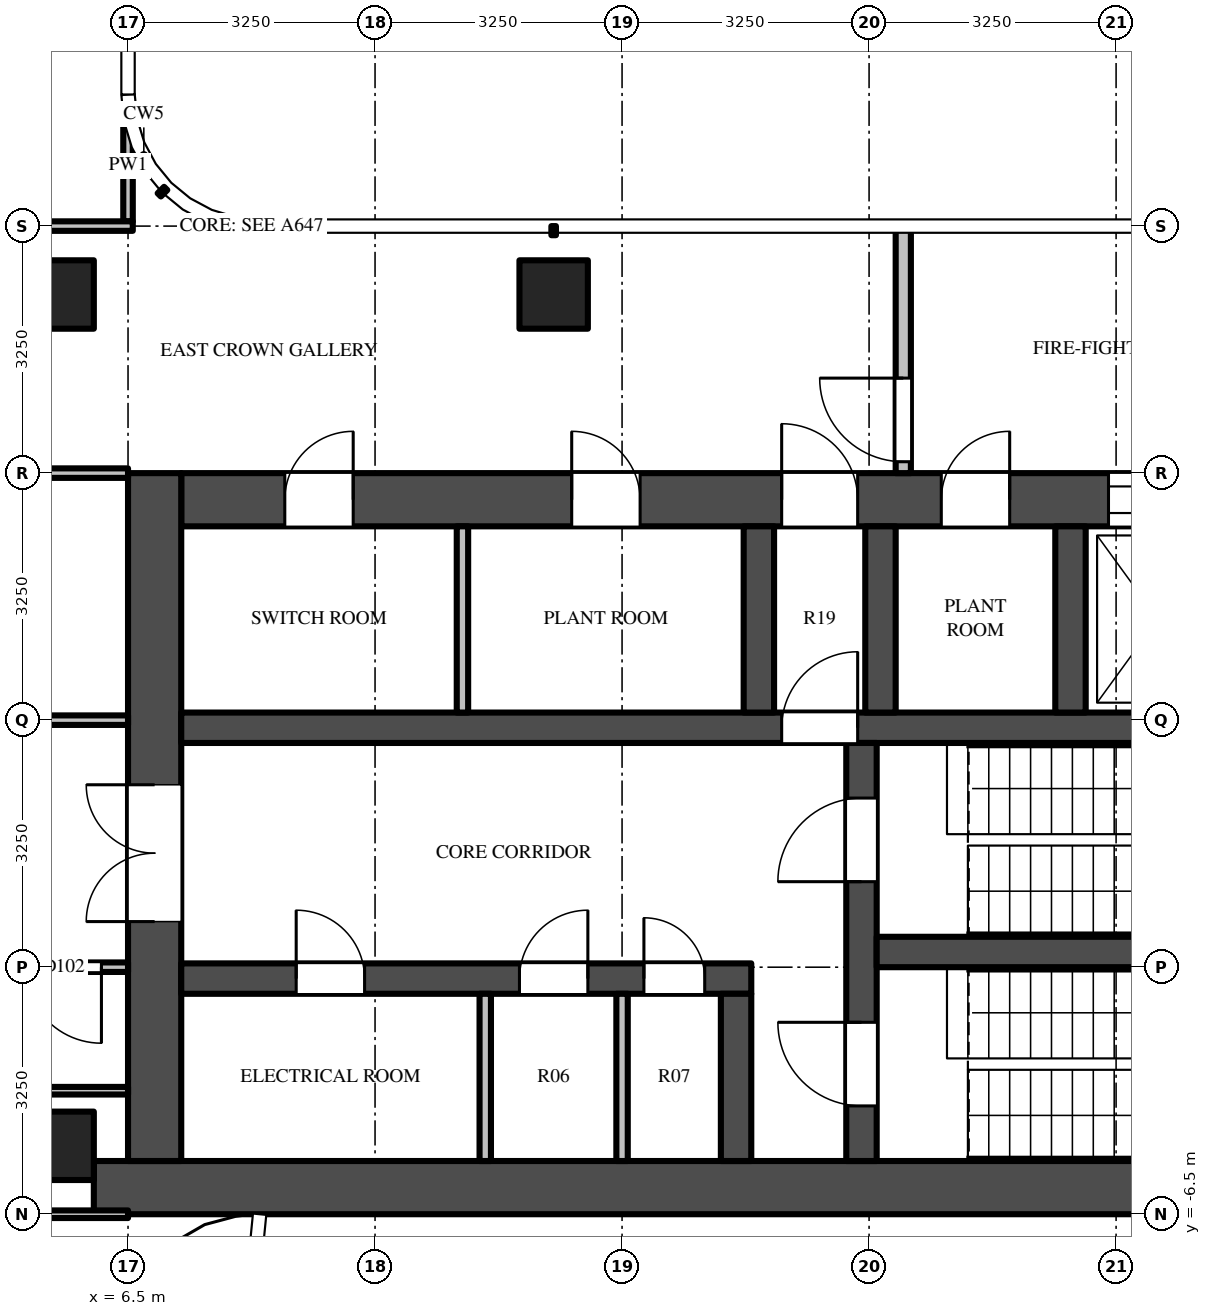
"""IFC4 building model, lengths in metres.
Left out: names, types, materials, properties, quantities, classifications, styles, units other than length and angle.
Written with IfcOpenShell. Run it as: python <this file> out.ifc"""

import sys

from ifc_helpers import new_model, si_unit, direction, frame, frame_2d, origin, origin_2d, place, context, subcontext, project, spatial, rectangle, extrude, source, transform, mapped, element, fill, save


model = new_model("IFC4")
c1 = context("Model", 3, precision=1e-05, world=origin(), true_north=direction((0.0, 1.0)))
c2 = subcontext(c1, "Body", "Model", "MODEL_VIEW")
j1 = project(units=[si_unit("LENGTHUNIT", "METRE"), si_unit("PLANEANGLEUNIT", "RADIAN")], contexts=[c1])
p1 = place(None, origin())
s1 = spatial("IfcSite", under=j1, at=p1, CompositionType="ELEMENT")
p2 = place(p1, origin())
s2 = spatial("IfcBuilding", under=s1, at=p2, CompositionType="ELEMENT")
p3 = place(p2, frame((0.0, 0.0, 346.1)))
s3 = spatial("IfcBuildingStorey", under=s2, at=p3, CompositionType="ELEMENT", Elevation=346.1)
m1 = source(origin(), c2, "Body", "SweptSolid", [
    extrude(rectangle(XDim=0.9, YDim=0.9, at=origin_2d()), origin(), (0.0, 0.0, 1.0), 4.0),
])
for number, where, z_axis, x_axis in (
    (1, (12.1, 5.6, 0.0), (0.0, 0.0, 1.0), (1.0, 0.0, 0.0)),
    (2, (5.6, 5.6, 0.0), (0.0, 0.0, 1.0), (1.0, 0.0, 0.0)),
    (3, (5.6, -5.6, 0.0), (0.0, 0.0, 1.0), (1.0, 0.0, 0.0)),
):
    element("IfcColumn", number, at=place(p3, frame(where, z_axis=z_axis, x_axis=x_axis)), inside=s3, PredefinedType="COLUMN", context=c2, shape_type="MappedRepresentation", body=[
        mapped(m1, transform((0.0, 0.0, 0.0))),
    ])
m2 = source(origin(), c2, "Body", "SweptSolid", [
    extrude(rectangle(XDim=16.7, YDim=0.7, at=frame_2d((8.35, 0.0))), origin(), (0.0, 0.0, 1.0), 3.75),
])
p4 = place(p3, frame((6.05, -6.15, 0.0), z_axis=(0.0, 0.0, 1.0), x_axis=(1.0, 0.0, 0.0)))
e4 = element("IfcWall", 4, at=p4, inside=s3, PredefinedType="SHEAR", context=c2, shape_type="MappedRepresentation", body=[
    mapped(m2, transform((0.0, 0.0, 0.0))),
])
m3 = source(origin(), c2, "Body", "SweptSolid", [
    extrude(rectangle(XDim=14.85, YDim=0.7, at=frame_2d((7.425, 0.0))), origin(), (0.0, 0.0, 1.0), 3.75),
])
p5 = place(p3, frame((7.2, 2.9, 0.0), z_axis=(0.0, 0.0, 1.0), x_axis=(1.0, 0.0, 0.0)))
e5 = element("IfcWall", 5, at=p5, inside=s3, PredefinedType="SHEAR", context=c2, shape_type="MappedRepresentation", body=[
    mapped(m3, transform((0.0, 0.0, 0.0))),
])
m4 = source(origin(), c2, "Body", "SweptSolid", [
    extrude(rectangle(XDim=1.3, YDim=2.1, at=frame_2d((0.65, 1.05))), frame((0.0, 0.36, 0.0), z_axis=(0.0, -1.0, 0.0), x_axis=(1.0, 0.0, 0.0)), (0.0, 0.0, 1.0), 0.72),
])
p6 = place(p5, frame((12.2, 0.0, 0.0)))
e6 = element("IfcOpeningElement", 6, at=p6, cuts=e5, PredefinedType="OPENING", context=c2, shape_type="MappedRepresentation", body=[
    mapped(m4, transform((0.0, 0.0, 0.0))),
])
m5 = source(origin(), c2, "Body", "SweptSolid", [
    extrude(rectangle(XDim=1.0, YDim=2.1, at=frame_2d((0.5, 1.05))), frame((0.0, 0.36, 0.0), z_axis=(0.0, -1.0, 0.0), x_axis=(1.0, 0.0, 0.0)), (0.0, 0.0, 1.0), 0.72),
])
p7 = place(p5, frame((7.9, 0.0, 0.0)))
e7 = element("IfcOpeningElement", 7, at=p7, cuts=e5, PredefinedType="OPENING", context=c2, shape_type="MappedRepresentation", body=[
    mapped(m5, transform((0.0, 0.0, 0.0))),
])
m6 = source(origin(), c2, "Body", "SweptSolid", [
    extrude(rectangle(XDim=0.9, YDim=2.1, at=frame_2d((0.45, 1.05))), frame((0.0, 0.36, 0.0), z_axis=(0.0, -1.0, 0.0), x_axis=(1.0, 0.0, 0.0)), (0.0, 0.0, 1.0), 0.72),
])
p8 = place(p5, frame((1.363, 0.0, 0.0)))
e8 = element("IfcOpeningElement", 8, at=p8, cuts=e5, PredefinedType="OPENING", context=c2, shape_type="MappedRepresentation", body=[
    mapped(m6, transform((0.0, 0.0, 0.0))),
])
p9 = place(p5, frame((5.137, 0.0, 0.0)))
e9 = element("IfcOpeningElement", 9, at=p9, cuts=e5, PredefinedType="OPENING", context=c2, shape_type="MappedRepresentation", body=[
    mapped(m6, transform((0.0, 0.0, 0.0))),
])
p10 = place(p5, frame((10.0, 0.0, 0.0)))
e10 = element("IfcOpeningElement", 10, at=p10, cuts=e5, PredefinedType="OPENING", context=c2, shape_type="MappedRepresentation", body=[
    mapped(m6, transform((0.0, 0.0, 0.0))),
])
m7 = source(origin(), c2, "Body", "SweptSolid", [
    extrude(rectangle(XDim=9.05, YDim=0.7, at=frame_2d((4.525, 0.0))), origin(), (0.0, 0.0, 1.0), 3.75),
])
p11 = place(p3, frame((6.85, -5.8, 0.0), z_axis=(0.0, 0.0, 1.0), x_axis=(0.0, 1.0, 0.0)))
e11 = element("IfcWall", 11, at=p11, inside=s3, PredefinedType="SHEAR", context=c2, shape_type="MappedRepresentation", body=[
    mapped(m7, transform((0.0, 0.0, 0.0))),
])
m8 = source(origin(), c2, "Body", "SweptSolid", [
    extrude(rectangle(XDim=1.8, YDim=2.1, at=frame_2d((0.9, 1.05))), frame((0.0, 0.36, 0.0), z_axis=(0.0, -1.0, 0.0), x_axis=(1.0, 0.0, 0.0)), (0.0, 0.0, 1.0), 0.72),
])
p12 = place(p11, frame((3.15, 0.0, 0.0)))
e12 = element("IfcOpeningElement", 12, at=p12, cuts=e11, PredefinedType="OPENING", context=c2, shape_type="MappedRepresentation", body=[
    mapped(m8, transform((0.0, 0.0, 0.0))),
])
m9 = source(origin(), c2, "Body", "SweptSolid", [
    extrude(rectangle(XDim=7.5, YDim=0.4, at=frame_2d((3.75, 0.0))), origin(), (0.0, 0.0, 1.0), 3.75),
])
p13 = place(p3, frame((7.2, -3.4, 0.0), z_axis=(0.0, 0.0, 1.0), x_axis=(1.0, 0.0, 0.0)))
e13 = element("IfcWall", 13, at=p13, inside=s3, PredefinedType="SHEAR", context=c2, shape_type="MappedRepresentation", body=[
    mapped(m9, transform((0.0, 0.0, 0.0))),
])
m10 = source(origin(), c2, "Body", "SweptSolid", [
    extrude(rectangle(XDim=0.9, YDim=2.1, at=frame_2d((0.45, 1.05))), frame((0.0, 0.21, 0.0), z_axis=(0.0, -1.0, 0.0), x_axis=(1.0, 0.0, 0.0)), (0.0, 0.0, 1.0), 0.42),
])
p14 = place(p13, frame((1.512, 0.0, 0.0)))
e14 = element("IfcOpeningElement", 14, at=p14, cuts=e13, PredefinedType="OPENING", context=c2, shape_type="MappedRepresentation", body=[
    mapped(m10, transform((0.0, 0.0, 0.0))),
])
p15 = place(p13, frame((4.45, 0.0, 0.0)))
e15 = element("IfcOpeningElement", 15, at=p15, cuts=e13, PredefinedType="OPENING", context=c2, shape_type="MappedRepresentation", body=[
    mapped(m10, transform((0.0, 0.0, 0.0))),
])
m11 = source(origin(), c2, "Body", "SweptSolid", [
    extrude(rectangle(XDim=0.8, YDim=2.1, at=frame_2d((0.4, 1.05))), frame((0.0, 0.21, 0.0), z_axis=(0.0, -1.0, 0.0), x_axis=(1.0, 0.0, 0.0)), (0.0, 0.0, 1.0), 0.42),
])
p16 = place(p13, frame((6.087, 0.0, 0.0)))
e16 = element("IfcOpeningElement", 16, at=p16, cuts=e13, PredefinedType="OPENING", context=c2, shape_type="MappedRepresentation", body=[
    mapped(m11, transform((0.0, 0.0, 0.0))),
])
m12 = source(origin(), c2, "Body", "SweptSolid", [
    extrude(rectangle(XDim=14.85, YDim=0.4, at=frame_2d((7.425, 0.0))), origin(), (0.0, 0.0, 1.0), 3.75),
])
p17 = place(p3, frame((7.2, -0.1, 0.0), z_axis=(0.0, 0.0, 1.0), x_axis=(1.0, 0.0, 0.0)))
e17 = element("IfcWall", 17, at=p17, inside=s3, PredefinedType="SHEAR", context=c2, shape_type="MappedRepresentation", body=[
    mapped(m12, transform((0.0, 0.0, 0.0))),
])
m13 = source(origin(), c2, "Body", "SweptSolid", [
    extrude(rectangle(XDim=1.0, YDim=2.1, at=frame_2d((0.5, 1.05))), frame((0.0, 0.21, 0.0), z_axis=(0.0, -1.0, 0.0), x_axis=(1.0, 0.0, 0.0)), (0.0, 0.0, 1.0), 0.42),
])
p18 = place(p17, frame((7.9, 0.0, 0.0)))
e18 = element("IfcOpeningElement", 18, at=p18, cuts=e17, PredefinedType="OPENING", context=c2, shape_type="MappedRepresentation", body=[
    mapped(m13, transform((0.0, 0.0, 0.0))),
])
m14 = source(origin(), c2, "Body", "SweptSolid", [
    extrude(rectangle(XDim=5.5, YDim=0.4, at=frame_2d((2.75, 0.0))), origin(), (0.0, 0.0, 1.0), 3.75),
])
p19 = place(p3, frame((16.15, -5.8, 0.0), z_axis=(0.0, 0.0, 1.0), x_axis=(0.0, 1.0, 0.0)))
e19 = element("IfcWall", 19, at=p19, inside=s3, PredefinedType="SHEAR", context=c2, shape_type="MappedRepresentation", body=[
    mapped(m14, transform((0.0, 0.0, 0.0))),
])
m15 = source(origin(), c2, "Body", "SweptSolid", [
    extrude(rectangle(XDim=1.1, YDim=2.1, at=frame_2d((0.55, 1.05))), frame((0.0, 0.21, 0.0), z_axis=(0.0, -1.0, 0.0), x_axis=(1.0, 0.0, 0.0)), (0.0, 0.0, 1.0), 0.42),
])
p20 = place(p19, frame((0.725, 0.0, 0.0)))
e20 = element("IfcOpeningElement", 20, at=p20, cuts=e19, PredefinedType="OPENING", context=c2, shape_type="MappedRepresentation", body=[
    mapped(m15, transform((0.0, 0.0, 0.0))),
])
p21 = place(p19, frame((3.675, 0.0, 0.0)))
e21 = element("IfcOpeningElement", 21, at=p21, cuts=e19, PredefinedType="OPENING", context=c2, shape_type="MappedRepresentation", body=[
    mapped(m15, transform((0.0, 0.0, 0.0))),
])
m16 = source(origin(), c2, "Body", "SweptSolid", [
    extrude(rectangle(XDim=5.7, YDim=0.4, at=frame_2d((2.85, 0.0))), origin(), (0.0, 0.0, 1.0), 3.75),
])
p22 = place(p3, frame((16.35, -3.05, 0.0), z_axis=(0.0, 0.0, 1.0), x_axis=(1.0, 0.0, 0.0)))
e22 = element("IfcWall", 22, at=p22, inside=s3, PredefinedType="SHEAR", context=c2, shape_type="MappedRepresentation", body=[
    mapped(m16, transform((0.0, 0.0, 0.0))),
])
m17 = source(origin(), c2, "Body", "SweptSolid", [
    extrude(rectangle(XDim=2.2, YDim=0.4, at=frame_2d((1.1, 0.0))), origin(), (0.0, 0.0, 1.0), 3.75),
])
p23 = place(p3, frame((14.5, -5.8, 0.0), z_axis=(0.0, 0.0, 1.0), x_axis=(0.0, 1.0, 0.0)))
e23 = element("IfcWall", 23, at=p23, inside=s3, PredefinedType="SHEAR", context=c2, shape_type="MappedRepresentation", body=[
    mapped(m17, transform((0.0, 0.0, 0.0))),
])
m18 = source(origin(), c2, "Body", "SweptSolid", [
    extrude(rectangle(XDim=2.45, YDim=0.4, at=frame_2d((1.225, 0.0))), origin(), (0.0, 0.0, 1.0), 3.75),
])
for number, where, z_axis, x_axis in (
    (24, (14.8, 0.1, 0.0), (0.0, 0.0, 1.0), (0.0, 1.0, 0.0)),
    (25, (16.4, 0.1, 0.0), (0.0, 0.0, 1.0), (0.0, 1.0, 0.0)),
    (26, (18.9, 0.1, 0.0), (0.0, 0.0, 1.0), (0.0, 1.0, 0.0)),
):
    element("IfcWall", number, at=place(p3, frame(where, z_axis=z_axis, x_axis=x_axis)), inside=s3, PredefinedType="SHEAR", context=c2, shape_type="MappedRepresentation", body=[
        mapped(m18, transform((0.0, 0.0, 0.0))),
    ])
m19 = source(origin(), c2, "Body", "SweptSolid", [
    extrude(rectangle(XDim=3.25, YDim=0.2, at=frame_2d((1.625, 0.0))), origin(), (0.0, 0.0, 1.0), 3.75),
])
p24 = place(p3, frame((16.7, 3.25, 0.0), z_axis=(0.0, 0.0, 1.0), x_axis=(0.0, 1.0, 0.0)))
e27 = element("IfcWall", 27, at=p24, inside=s3, PredefinedType="PARTITIONING", context=c2, shape_type="MappedRepresentation", body=[
    mapped(m19, transform((0.0, 0.0, 0.0))),
])
m20 = source(origin(), c2, "Body", "SweptSolid", [
    extrude(rectangle(XDim=1.1, YDim=2.1, at=frame_2d((0.55, 1.05))), frame((0.0, 0.11, 0.0), z_axis=(0.0, -1.0, 0.0), x_axis=(1.0, 0.0, 0.0)), (0.0, 0.0, 1.0), 0.22),
])
p25 = place(p24, frame((0.15, 0.0, 0.0)))
e28 = element("IfcOpeningElement", 28, at=p25, cuts=e27, PredefinedType="OPENING", context=c2, shape_type="MappedRepresentation", body=[
    mapped(m20, transform((0.0, 0.0, 0.0))),
])
m21 = source(origin(), c2, "Body", "SweptSolid", [
    extrude(rectangle(XDim=2.2, YDim=0.15, at=frame_2d((1.1, 0.0))), origin(), (0.0, 0.0, 1.0), 3.75),
])
for number, where, z_axis, x_axis in (
    (29, (11.2, -5.8, 0.0), (0.0, 0.0, 1.0), (0.0, 1.0, 0.0)),
    (30, (13.0, -5.8, 0.0), (0.0, 0.0, 1.0), (0.0, 1.0, 0.0)),
):
    element("IfcWall", number, at=place(p3, frame(where, z_axis=z_axis, x_axis=x_axis)), inside=s3, PredefinedType="PARTITIONING", context=c2, shape_type="MappedRepresentation", body=[
        mapped(m21, transform((0.0, 0.0, 0.0))),
    ])
m22 = source(origin(), c2, "Body", "SweptSolid", [
    extrude(rectangle(XDim=2.45, YDim=0.15, at=frame_2d((1.225, 0.0))), origin(), (0.0, 0.0, 1.0), 3.75),
])
p26 = place(p3, frame((10.9, 0.1, 0.0), z_axis=(0.0, 0.0, 1.0), x_axis=(0.0, 1.0, 0.0)))
e31 = element("IfcWall", 31, at=p26, inside=s3, PredefinedType="PARTITIONING", context=c2, shape_type="MappedRepresentation", body=[
    mapped(m22, transform((0.0, 0.0, 0.0))),
])
m23 = source(origin(), c2, "Body", "SweptSolid", [
    extrude(rectangle(XDim=1.469, YDim=0.125, at=frame_2d((0.734, 0.0))), origin(), (0.0, 0.0, 1.0), 3.75),
])
p27 = place(p3, frame((6.5, 6.562, 0.0), z_axis=(0.0, 0.0, 1.0), x_axis=(0.0, 1.0, 0.0)))
e32 = element("IfcWall", 32, at=p27, inside=s3, PredefinedType="PARTITIONING", context=c2, shape_type="MappedRepresentation", body=[
    mapped(m23, transform((0.0, 0.0, 0.0))),
])
m24 = source(origin(), c2, "Body", "SweptSolid", [
    extrude(rectangle(XDim=5.363, YDim=0.1, at=frame_2d((2.681, 0.0))), origin(), (0.0, 0.0, 1.0), 2.83),
])
p28 = place(p3, frame((1.137, -6.5, 0.0), z_axis=(0.0, 0.0, 1.0), x_axis=(1.0, 0.0, 0.0)))
e33 = element("IfcWall", 33, at=p28, inside=s3, PredefinedType="PARTITIONING", context=c2, shape_type="MappedRepresentation", body=[
    mapped(m24, transform((0.0, 0.0, 0.0))),
])
p29 = place(p3, frame((1.262, -4.875, 0.0), z_axis=(0.0, 0.0, 1.0), x_axis=(1.0, 0.0, 0.0)))
e34 = element("IfcWall", 34, at=p29, inside=s3, PredefinedType="PARTITIONING", context=c2, shape_type="SweptSolid", body=[
    extrude(rectangle(XDim=5.238, YDim=0.1, at=frame_2d((2.619, 0.0))), origin(), (0.0, 0.0, 1.0), 3.046),
])
m25 = source(origin(), c2, "Body", "SweptSolid", [
    extrude(rectangle(XDim=5.363, YDim=0.125, at=frame_2d((2.681, 0.0))), origin(), (0.0, 0.0, 1.0), 3.046),
])
p30 = place(p3, frame((6.5, -3.25, 0.0), z_axis=(0.0, 0.0, 1.0), x_axis=(-1.0, 0.0, 0.0)))
e35 = element("IfcWall", 35, at=p30, inside=s3, PredefinedType="PARTITIONING", context=c2, shape_type="MappedRepresentation", body=[
    mapped(m25, transform((0.0, 0.0, 0.0))),
])
m26 = source(origin(), c2, "Body", "SweptSolid", [
    extrude(rectangle(XDim=1.0, YDim=2.1, at=frame_2d((0.5, 1.05))), frame((0.0, 0.073, 0.0), z_axis=(0.0, -1.0, 0.0), x_axis=(1.0, 0.0, 0.0)), (0.0, 0.0, 1.0), 0.145),
])
p31 = place(p30, frame((0.35, 0.0, 0.0)))
e36 = element("IfcOpeningElement", 36, at=p31, cuts=e35, PredefinedType="OPENING", context=c2, shape_type="MappedRepresentation", body=[
    mapped(m26, transform((0.0, 0.0, 0.0))),
])
p32 = place(p3, frame((6.5, 0.0, 0.0), z_axis=(0.0, 0.0, 1.0), x_axis=(-1.0, 0.0, 0.0)))
e37 = element("IfcWall", 37, at=p32, inside=s3, PredefinedType="PARTITIONING", context=c2, shape_type="MappedRepresentation", body=[
    mapped(m25, transform((0.0, 0.0, 0.0))),
])
p33 = place(p32, frame((3.95, 0.0, 0.0)))
e38 = element("IfcOpeningElement", 38, at=p33, cuts=e37, PredefinedType="OPENING", context=c2, shape_type="MappedRepresentation", body=[
    mapped(m26, transform((0.0, 0.0, 0.0))),
])
p34 = place(p3, frame((1.137, 3.25, 0.0), z_axis=(0.0, 0.0, 1.0), x_axis=(1.0, 0.0, 0.0)))
e39 = element("IfcWall", 39, at=p34, inside=s3, PredefinedType="PARTITIONING", context=c2, shape_type="MappedRepresentation", body=[
    mapped(m25, transform((0.0, 0.0, 0.0))),
])
m27 = source(origin(), c2, "Body", "SweptSolid", [
    extrude(rectangle(XDim=7.825, YDim=0.125, at=frame_2d((3.913, 0.0))), origin(), (0.0, 0.0, 1.0), 2.83),
])
p35 = place(p3, frame((-1.262, 6.5, 0.0), z_axis=(0.0, 0.0, 1.0), x_axis=(1.0, 0.0, 0.0)))
e40 = element("IfcWall", 40, at=p35, inside=s3, PredefinedType="PARTITIONING", context=c2, shape_type="MappedRepresentation", body=[
    mapped(m27, transform((0.0, 0.0, 0.0))),
])
m28 = source(origin(), c2, "Body", "SweptSolid", [
    extrude(rectangle(XDim=1.8, YDim=2.1, at=frame_2d((0.9, 1.05))), frame((0.0, 0.073, 0.0), z_axis=(0.0, -1.0, 0.0), x_axis=(1.0, 0.0, 0.0)), (0.0, 0.0, 1.0), 0.145),
])
p36 = place(p35, frame((4.512, 0.0, 0.0)))
e41 = element("IfcOpeningElement", 41, at=p36, cuts=e40, PredefinedType="OPENING", context=c2, shape_type="MappedRepresentation", body=[
    mapped(m28, transform((0.0, 0.0, 0.0))),
])
m29 = source(origin(), c2, "Body", "SweptSolid", [
    extrude(rectangle(XDim=1.3, YDim=2.1, at=frame_2d((0.65, 1.05))), frame((0.0, -0.275, 0.0), z_axis=(0.0, -1.0, 0.0), x_axis=(1.0, 0.0, 0.0)), (0.0, 0.0, 1.0), 0.05),
])
p37 = place(p6, origin())
e42 = element("IfcDoor", 42, at=p37, inside=s3, OperationType="DOUBLE_DOOR_SLIDING", PredefinedType="DOOR", context=c2, shape_type="MappedRepresentation", body=[
    mapped(m29, transform((0.0, 0.0, 0.0))),
])
fill(e6, e42)
m30 = source(origin(), c2, "Body", "SweptSolid", [
    extrude(rectangle(XDim=1.8, YDim=2.1, at=frame_2d((0.9, 1.05))), frame((0.0, -0.275, 0.0), z_axis=(0.0, -1.0, 0.0), x_axis=(1.0, 0.0, 0.0)), (0.0, 0.0, 1.0), 0.05),
])
p38 = place(p12, origin())
e43 = element("IfcDoor", 43, at=p38, inside=s3, OperationType="DOUBLE_DOOR_SINGLE_SWING", PredefinedType="DOOR", context=c2, shape_type="MappedRepresentation", body=[
    mapped(m30, transform((0.0, 0.0, 0.0))),
])
fill(e12, e43)
m31 = source(origin(), c2, "Body", "SweptSolid", [
    extrude(rectangle(XDim=1.1, YDim=2.1, at=frame_2d((0.55, 1.05))), frame((0.0, 0.025, 0.0), z_axis=(0.0, -1.0, 0.0), x_axis=(1.0, 0.0, 0.0)), (0.0, 0.0, 1.0), 0.05),
])
p39 = place(p20, origin())
e44 = element("IfcDoor", 44, at=p39, inside=s3, OperationType="SINGLE_SWING_RIGHT", PredefinedType="DOOR", context=c2, shape_type="MappedRepresentation", body=[
    mapped(m31, transform((0.0, 0.0, 0.0))),
])
fill(e20, e44)
p40 = place(p21, origin())
e45 = element("IfcDoor", 45, at=p40, inside=s3, OperationType="SINGLE_SWING_LEFT", PredefinedType="DOOR", context=c2, shape_type="MappedRepresentation", body=[
    mapped(m31, transform((0.0, 0.0, 0.0))),
])
fill(e21, e45)
m32 = source(origin(), c2, "Body", "SweptSolid", [
    extrude(rectangle(XDim=1.0, YDim=2.1, at=frame_2d((0.5, 1.05))), frame((0.0, 0.025, 0.0), z_axis=(0.0, -1.0, 0.0), x_axis=(1.0, 0.0, 0.0)), (0.0, 0.0, 1.0), 0.05),
])
p41 = place(p18, origin())
e46 = element("IfcDoor", 46, at=p41, inside=s3, OperationType="SINGLE_SWING_RIGHT", PredefinedType="DOOR", context=c2, shape_type="MappedRepresentation", body=[
    mapped(m32, transform((0.0, 0.0, 0.0))),
])
fill(e18, e46)
m33 = source(origin(), c2, "Body", "SweptSolid", [
    extrude(rectangle(XDim=1.0, YDim=2.1, at=frame_2d((0.5, 1.05))), frame((0.0, -0.275, 0.0), z_axis=(0.0, -1.0, 0.0), x_axis=(1.0, 0.0, 0.0)), (0.0, 0.0, 1.0), 0.05),
])
p42 = place(p7, origin())
e47 = element("IfcDoor", 47, at=p42, inside=s3, OperationType="SINGLE_SWING_LEFT", PredefinedType="DOOR", context=c2, shape_type="MappedRepresentation", body=[
    mapped(m33, transform((0.0, 0.0, 0.0))),
])
fill(e7, e47)
p43 = place(p25, origin())
e48 = element("IfcDoor", 48, at=p43, inside=s3, OperationType="SINGLE_SWING_RIGHT", PredefinedType="DOOR", context=c2, shape_type="MappedRepresentation", body=[
    mapped(m31, transform((0.0, 0.0, 0.0))),
])
fill(e28, e48)
m34 = source(origin(), c2, "Body", "SweptSolid", [
    extrude(rectangle(XDim=0.9, YDim=2.1, at=frame_2d((0.45, 1.05))), frame((0.0, 0.025, 0.0), z_axis=(0.0, -1.0, 0.0), x_axis=(1.0, 0.0, 0.0)), (0.0, 0.0, 1.0), 0.05),
])
p44 = place(p14, origin())
e49 = element("IfcDoor", 49, at=p44, inside=s3, OperationType="SINGLE_SWING_LEFT", PredefinedType="DOOR", context=c2, shape_type="MappedRepresentation", body=[
    mapped(m34, transform((0.0, 0.0, 0.0))),
])
fill(e14, e49)
p45 = place(p15, origin())
e50 = element("IfcDoor", 50, at=p45, inside=s3, OperationType="SINGLE_SWING_RIGHT", PredefinedType="DOOR", context=c2, shape_type="MappedRepresentation", body=[
    mapped(m34, transform((0.0, 0.0, 0.0))),
])
fill(e15, e50)
m35 = source(origin(), c2, "Body", "SweptSolid", [
    extrude(rectangle(XDim=0.8, YDim=2.1, at=frame_2d((0.4, 1.05))), frame((0.0, 0.025, 0.0), z_axis=(0.0, -1.0, 0.0), x_axis=(1.0, 0.0, 0.0)), (0.0, 0.0, 1.0), 0.05),
])
p46 = place(p16, origin())
e51 = element("IfcDoor", 51, at=p46, inside=s3, OperationType="SINGLE_SWING_LEFT", PredefinedType="DOOR", context=c2, shape_type="MappedRepresentation", body=[
    mapped(m35, transform((0.0, 0.0, 0.0))),
])
fill(e16, e51)
m36 = source(origin(), c2, "Body", "SweptSolid", [
    extrude(rectangle(XDim=0.9, YDim=2.1, at=frame_2d((0.45, 1.05))), frame((0.0, -0.275, 0.0), z_axis=(0.0, -1.0, 0.0), x_axis=(1.0, 0.0, 0.0)), (0.0, 0.0, 1.0), 0.05),
])
p47 = place(p8, origin())
e52 = element("IfcDoor", 52, at=p47, inside=s3, OperationType="SINGLE_SWING_RIGHT", PredefinedType="DOOR", context=c2, shape_type="MappedRepresentation", body=[
    mapped(m36, transform((0.0, 0.0, 0.0))),
])
fill(e8, e52)
p48 = place(p9, origin())
e53 = element("IfcDoor", 53, at=p48, inside=s3, OperationType="SINGLE_SWING_LEFT", PredefinedType="DOOR", context=c2, shape_type="MappedRepresentation", body=[
    mapped(m36, transform((0.0, 0.0, 0.0))),
])
fill(e9, e53)
p49 = place(p10, origin())
e54 = element("IfcDoor", 54, at=p49, inside=s3, OperationType="SINGLE_SWING_RIGHT", PredefinedType="DOOR", context=c2, shape_type="MappedRepresentation", body=[
    mapped(m36, transform((0.0, 0.0, 0.0))),
])
fill(e10, e54)
p50 = place(p31, origin())
e55 = element("IfcDoor", 55, at=p50, inside=s3, OperationType="SINGLE_SWING_LEFT", PredefinedType="DOOR", context=c2, shape_type="MappedRepresentation", body=[
    mapped(m32, transform((0.0, 0.0, 0.0))),
])
fill(e36, e55)
save(model, sys.argv[1])
